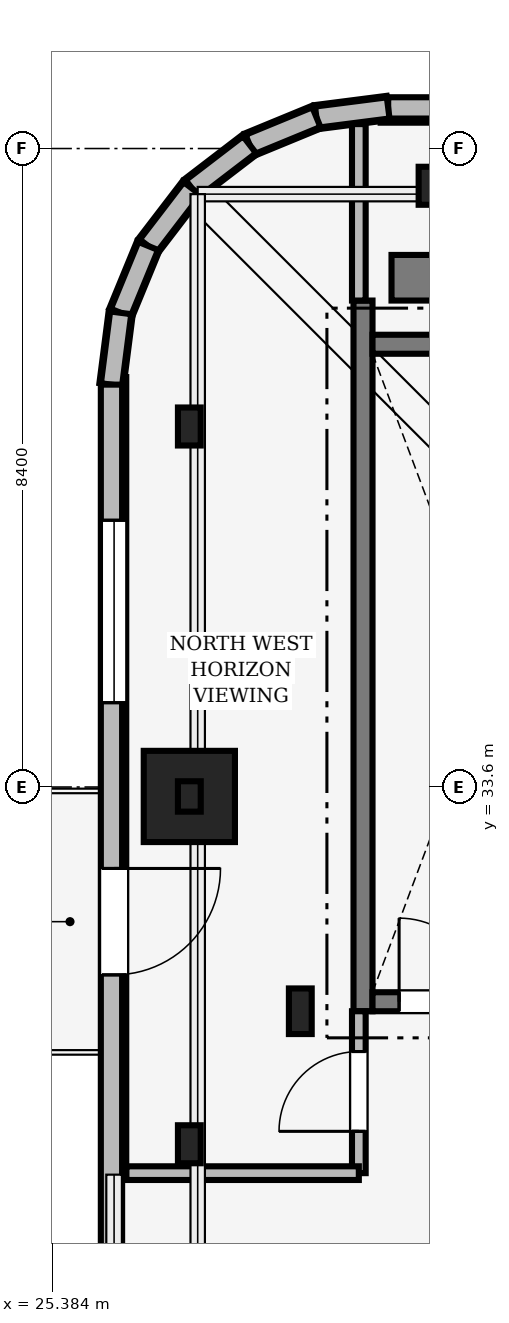
"""IFC4 building model, lengths in metres.
Left out: names, types, materials, properties, quantities, classifications, styles, units other than length and angle.
Written with IfcOpenShell. Run it as: python <this file> out.ifc"""

import sys

from ifc_helpers import new_model, si_unit, direction, frame, frame_2d, origin, origin_2d, place, context, subcontext, project, spatial, rectangle, i_section, extrude, source, transform, mapped, element, fill, save


model = new_model("IFC4")
c1 = context("Model", 3, precision=1e-05, world=origin(), true_north=direction((0.0, 1.0)))
c2 = subcontext(c1, "Body", "Model", "MODEL_VIEW")
j1 = project(units=[si_unit("LENGTHUNIT", "METRE"), si_unit("PLANEANGLEUNIT", "RADIAN")], contexts=[c1])
p1 = place(None, origin())
s1 = spatial("IfcSite", under=j1, at=p1, CompositionType="ELEMENT")
p2 = place(p1, origin())
s2 = spatial("IfcBuilding", under=s1, at=p2, CompositionType="ELEMENT")
p3 = place(p2, frame((0.0, 0.0, 301.15)))
s3 = spatial("IfcBuildingStorey", under=s2, at=p3, CompositionType="ELEMENT", Elevation=301.15)
m1 = source(origin(), c2, "Body", "SweptSolid", [
    extrude(rectangle(XDim=17.52, YDim=0.6, at=frame_2d((8.76, 0.0))), origin(), (0.0, 0.0, 1.0), 4.7),
])
p4 = place(p3, frame((29.85, 40.3, 0.0), z_axis=(0.0, 0.0, 1.0), x_axis=(1.0, 0.0, 0.0)))
e1 = element("IfcWall", 1, at=p4, inside=s3, PredefinedType="SHEAR", context=c2, shape_type="MappedRepresentation", body=[
    mapped(m1, transform((0.0, 0.0, 0.0), scale=1.0)),
])
m2 = source(origin(), c2, "Body", "SweptSolid", [
    extrude(i_section(OverallWidth=0.3, OverallDepth=0.6, WebThickness=0.015, FlangeThickness=0.03, FilletRadius=0.027, at=origin_2d()), origin(), (0.0, 0.0, 1.0), 4.6),
])
p5 = place(p3, frame((28.65, 30.65, 0.0), z_axis=(0.0, 0.0, 1.0), x_axis=(1.0, 0.0, 0.0)))
e2 = element("IfcColumn", 2, at=p5, inside=s3, PredefinedType="COLUMN", context=c2, shape_type="MappedRepresentation", body=[
    mapped(m2, transform((0.0, 0.0, 0.0), scale=1.0)),
])
m3 = source(origin(), c2, "Body", "SweptSolid", [
    extrude(rectangle(XDim=1.2, YDim=1.2, at=origin_2d()), origin(), (0.0, 0.0, 1.0), 4.6),
])
p6 = place(p3, frame((27.19, 33.476, 0.0), z_axis=(0.0, 0.0, 1.0), x_axis=(1.0, 0.0, 0.0)))
e3 = element("IfcColumn", 3, at=p6, inside=s3, PredefinedType="COLUMN", context=c2, shape_type="MappedRepresentation", body=[
    mapped(m3, transform((0.0, 0.0, 0.0), scale=1.0)),
])
m4 = source(origin(), c2, "Body", "SweptSolid", [
    extrude(i_section(OverallWidth=0.3, OverallDepth=0.5, WebThickness=0.014, FlangeThickness=0.028, FilletRadius=0.027, at=origin_2d()), origin(), (0.0, 0.0, 1.0), 4.6),
])
for number, where, z_axis, x_axis in (
    (4, (30.357, 41.51, 0.0), (0.0, 0.0, 1.0), (1.0, 0.0, 0.0)),
    (5, (27.19, 38.343, 0.0), (0.0, 0.0, 1.0), (1.0, 0.0, 0.0)),
    (6, (27.19, 28.9, 0.0), (0.0, 0.0, 1.0), (1.0, 0.0, 0.0)),
):
    element("IfcColumn", number, at=place(p3, frame(where, z_axis=z_axis, x_axis=x_axis)), inside=s3, PredefinedType="COLUMN", context=c2, shape_type="MappedRepresentation", body=[
        mapped(m4, transform((0.0, 0.0, 0.0), scale=1.0)),
    ])
m5 = source(origin(), c2, "Body", "SweptSolid", [
    extrude(i_section(OverallWidth=0.3, OverallDepth=0.4, WebThickness=0.013, FlangeThickness=0.024, FilletRadius=0.027, at=origin_2d()), origin(), (0.0, 0.0, 1.0), 12.85),
])
p7 = place(p3, frame((27.19, 33.476, 5.0), z_axis=(0.0, 0.0, 1.0), x_axis=(1.0, 0.0, 0.0)))
e7 = element("IfcColumn", 7, at=p7, inside=s3, PredefinedType="COLUMN", context=c2, shape_type="MappedRepresentation", body=[
    mapped(m5, transform((0.0, 0.0, 0.0), scale=1.0)),
])
m6 = source(origin(), c2, "Body", "SweptSolid", [
    extrude(rectangle(XDim=10.493, YDim=0.32, at=frame_2d((5.247, 0.0))), origin(), (0.0, 0.0, 1.0), 4.6),
])
p8 = place(p3, frame((40.2, 42.5, 0.0), z_axis=(0.0, 0.0, 1.0), x_axis=(-1.0, 0.0, 0.0)))
e8 = element("IfcWall", 8, at=p8, inside=s3, PredefinedType="SOLIDWALL", context=c2, shape_type="MappedRepresentation", body=[
    mapped(m6, transform((0.0, 0.0, 0.0), scale=1.0)),
])
m7 = source(origin(), c2, "Body", "SweptSolid", [
    extrude(rectangle(XDim=2.4, YDim=3.2, at=frame_2d((1.2, 1.6))), frame((0.0, 0.17, 0.0), z_axis=(0.0, -1.0, 0.0), x_axis=(1.0, 0.0, 0.0)), (0.0, 0.0, 1.0), 0.34),
])
p9 = place(p8, frame((6.209, 0.0, 0.72)))
e9 = element("IfcOpeningElement", 9, at=p9, cuts=e8, PredefinedType="OPENING", context=c2, shape_type="MappedRepresentation", body=[
    mapped(m7, transform((0.0, 0.0, 0.0), scale=1.0)),
])
p10 = place(p3, frame((26.2, 38.993, 0.0), z_axis=(0.0, 0.0, 1.0), x_axis=(0.0, -1.0, 0.0)))
e10 = element("IfcWall", 10, at=p10, inside=s3, PredefinedType="SOLIDWALL", context=c2, shape_type="MappedRepresentation", body=[
    mapped(m6, transform((0.0, 0.0, 0.0), scale=1.0)),
])
m8 = source(origin(), c2, "Body", "SweptSolid", [
    extrude(rectangle(XDim=1.4, YDim=2.3, at=frame_2d((0.7, 1.15))), frame((0.0, 0.17, 0.0), z_axis=(0.0, -1.0, 0.0), x_axis=(1.0, 0.0, 0.0)), (0.0, 0.0, 1.0), 0.34),
])
p11 = place(p10, frame((6.465, 0.0, 0.0)))
e11 = element("IfcOpeningElement", 11, at=p11, cuts=e10, PredefinedType="OPENING", context=c2, shape_type="MappedRepresentation", body=[
    mapped(m8, transform((0.0, 0.0, 0.0), scale=1.0)),
])
p12 = place(p10, frame((1.884, 0.0, 0.72)))
e12 = element("IfcOpeningElement", 12, at=p12, cuts=e10, PredefinedType="OPENING", context=c2, shape_type="MappedRepresentation", body=[
    mapped(m7, transform((0.0, 0.0, 0.0), scale=1.0)),
])
m9 = source(origin(), c2, "Body", "SweptSolid", [
    extrude(rectangle(XDim=0.952, YDim=0.32, at=frame_2d((0.476, 0.0))), origin(), (0.0, 0.0, 1.0), 4.6),
])
p13 = place(p3, frame((29.806, 42.534, 0.0), z_axis=(0.0, 0.0, 1.0), x_axis=(-0.991850128376, -0.127410057845, 0.0)))
e13 = element("IfcWall", 13, at=p13, inside=s3, PredefinedType="SOLIDWALL", context=c2, shape_type="MappedRepresentation", body=[
    mapped(m9, transform((0.0, 0.0, 0.0), scale=1.0)),
])
m10 = source(origin(), c2, "Body", "SweptSolid", [
    extrude(rectangle(XDim=0.951, YDim=0.32, at=frame_2d((0.476, 0.0))), origin(), (0.0, 0.0, 1.0), 4.6),
])
p14 = place(p3, frame((28.862, 42.413, 0.0), z_axis=(0.0, 0.0, 1.0), x_axis=(-0.924731243055, -0.380620714252, 0.0)))
e14 = element("IfcWall", 14, at=p14, inside=s3, PredefinedType="SOLIDWALL", context=c2, shape_type="MappedRepresentation", body=[
    mapped(m10, transform((0.0, 0.0, 0.0), scale=1.0)),
])
m11 = source(origin(), c2, "Body", "SweptSolid", [
    extrude(rectangle(XDim=0.951, YDim=0.32, at=frame_2d((0.475, 0.0))), origin(), (0.0, 0.0, 1.0), 4.6),
])
p15 = place(p3, frame((27.982, 42.051, 0.0), z_axis=(0.0, 0.0, 1.0), x_axis=(-0.793825387185, -0.608145751166, 0.0)))
e15 = element("IfcWall", 15, at=p15, inside=s3, PredefinedType="SOLIDWALL", context=c2, shape_type="MappedRepresentation", body=[
    mapped(m11, transform((0.0, 0.0, 0.0), scale=1.0)),
])
m12 = source(origin(), c2, "Body", "SweptSolid", [
    extrude(rectangle(XDim=0.951, YDim=0.32, at=frame_2d((0.476, 0.0))), origin(), (0.0, 0.0, 1.0), 4.6),
])
p16 = place(p3, frame((27.227, 41.473, 0.0), z_axis=(0.0, 0.0, 1.0), x_axis=(-0.608183591152, -0.793796396725, 0.0)))
e16 = element("IfcWall", 16, at=p16, inside=s3, PredefinedType="SOLIDWALL", context=c2, shape_type="MappedRepresentation", body=[
    mapped(m12, transform((0.0, 0.0, 0.0), scale=1.0)),
])
p17 = place(p3, frame((26.649, 40.718, 0.0), z_axis=(0.0, 0.0, 1.0), x_axis=(-0.380620714252, -0.924731243055, 0.0)))
e17 = element("IfcWall", 17, at=p17, inside=s3, PredefinedType="SOLIDWALL", context=c2, shape_type="MappedRepresentation", body=[
    mapped(m10, transform((0.0, 0.0, 0.0), scale=1.0)),
])
p18 = place(p3, frame((26.287, 39.838, 0.0), z_axis=(0.0, 0.0, 1.0), x_axis=(-0.127410057845, -0.991850128376, 0.0)))
e18 = element("IfcWall", 18, at=p18, inside=s3, PredefinedType="SOLIDWALL", context=c2, shape_type="MappedRepresentation", body=[
    mapped(m9, transform((0.0, 0.0, 0.0), scale=1.0)),
])
m13 = source(origin(), c2, "Body", "SweptSolid", [
    extrude(rectangle(XDim=27.388, YDim=0.28, at=frame_2d((13.694, 0.0))), origin(), (0.0, 0.0, 1.0), 1.15),
])
p19 = place(p3, frame((57.194, 42.534, 5.0), z_axis=(0.0, 0.0, 1.0), x_axis=(-1.0, 0.0, 0.0)))
e19 = element("IfcWall", 19, at=p19, inside=s3, PredefinedType="SOLIDWALL", context=c2, shape_type="MappedRepresentation", body=[
    mapped(m13, transform((0.0, 0.0, 0.0), scale=1.0)),
])
m14 = source(origin(), c2, "Body", "SweptSolid", [
    extrude(rectangle(XDim=0.952, YDim=0.28, at=frame_2d((0.476, 0.0))), origin(), (0.0, 0.0, 1.0), 1.15),
])
p20 = place(p3, frame((29.806, 42.534, 5.0), z_axis=(0.0, 0.0, 1.0), x_axis=(-0.991850128376, -0.127410057845, 0.0)))
e20 = element("IfcWall", 20, at=p20, inside=s3, PredefinedType="SOLIDWALL", context=c2, shape_type="MappedRepresentation", body=[
    mapped(m14, transform((0.0, 0.0, 0.0), scale=1.0)),
])
m15 = source(origin(), c2, "Body", "SweptSolid", [
    extrude(rectangle(XDim=0.951, YDim=0.28, at=frame_2d((0.476, 0.0))), origin(), (0.0, 0.0, 1.0), 1.15),
])
p21 = place(p3, frame((28.862, 42.413, 5.0), z_axis=(0.0, 0.0, 1.0), x_axis=(-0.924731243055, -0.380620714252, 0.0)))
e21 = element("IfcWall", 21, at=p21, inside=s3, PredefinedType="SOLIDWALL", context=c2, shape_type="MappedRepresentation", body=[
    mapped(m15, transform((0.0, 0.0, 0.0), scale=1.0)),
])
m16 = source(origin(), c2, "Body", "SweptSolid", [
    extrude(rectangle(XDim=0.951, YDim=0.28, at=frame_2d((0.475, 0.0))), origin(), (0.0, 0.0, 1.0), 1.15),
])
p22 = place(p3, frame((27.982, 42.051, 5.0), z_axis=(0.0, 0.0, 1.0), x_axis=(-0.793825387185, -0.608145751166, 0.0)))
e22 = element("IfcWall", 22, at=p22, inside=s3, PredefinedType="SOLIDWALL", context=c2, shape_type="MappedRepresentation", body=[
    mapped(m16, transform((0.0, 0.0, 0.0), scale=1.0)),
])
m17 = source(origin(), c2, "Body", "SweptSolid", [
    extrude(rectangle(XDim=0.951, YDim=0.28, at=frame_2d((0.476, 0.0))), origin(), (0.0, 0.0, 1.0), 1.15),
])
p23 = place(p3, frame((27.227, 41.473, 5.0), z_axis=(0.0, 0.0, 1.0), x_axis=(-0.608183591152, -0.793796396725, 0.0)))
e23 = element("IfcWall", 23, at=p23, inside=s3, PredefinedType="SOLIDWALL", context=c2, shape_type="MappedRepresentation", body=[
    mapped(m17, transform((0.0, 0.0, 0.0), scale=1.0)),
])
p24 = place(p3, frame((26.649, 40.718, 5.0), z_axis=(0.0, 0.0, 1.0), x_axis=(-0.380620714252, -0.924731243055, 0.0)))
e24 = element("IfcWall", 24, at=p24, inside=s3, PredefinedType="SOLIDWALL", context=c2, shape_type="MappedRepresentation", body=[
    mapped(m15, transform((0.0, 0.0, 0.0), scale=1.0)),
])
p25 = place(p3, frame((26.287, 39.838, 5.0), z_axis=(0.0, 0.0, 1.0), x_axis=(-0.127410057845, -0.991850128376, 0.0)))
e25 = element("IfcWall", 25, at=p25, inside=s3, PredefinedType="SOLIDWALL", context=c2, shape_type="MappedRepresentation", body=[
    mapped(m14, transform((0.0, 0.0, 0.0), scale=1.0)),
])
p26 = place(p3, frame((26.166, 38.894, 5.0), z_axis=(0.0, 0.0, 1.0), x_axis=(0.0, -1.0, 0.0)))
e26 = element("IfcWall", 26, at=p26, inside=s3, PredefinedType="SOLIDWALL", context=c2, shape_type="MappedRepresentation", body=[
    mapped(m13, transform((0.0, 0.0, 0.0), scale=1.0)),
])
m18 = source(origin(), c2, "Body", "SweptSolid", [
    extrude(rectangle(XDim=9.35, YDim=0.25, at=frame_2d((4.675, 0.0))), origin(), (0.0, 0.0, 1.0), 4.6),
])
p27 = place(p3, frame((29.475, 30.65, 0.0), z_axis=(0.0, 0.0, 1.0), x_axis=(0.0, 1.0, 0.0)))
e27 = element("IfcWall", 27, at=p27, inside=s3, PredefinedType="SOLIDWALL", context=c2, shape_type="MappedRepresentation", body=[
    mapped(m18, transform((0.0, 0.0, 0.0), scale=1.0)),
])
m19 = source(origin(), c2, "Body", "SweptSolid", [
    extrude(rectangle(XDim=3.15, YDim=0.25, at=frame_2d((1.575, 0.0))), origin(), (0.0, 0.0, 1.0), 4.6),
])
p28 = place(p3, frame((29.6, 39.425, 0.0), z_axis=(0.0, 0.0, 1.0), x_axis=(1.0, 0.0, 0.0)))
e28 = element("IfcWall", 28, at=p28, inside=s3, PredefinedType="SOLIDWALL", context=c2, shape_type="MappedRepresentation", body=[
    mapped(m19, transform((0.0, 0.0, 0.0), scale=1.0)),
])
p29 = place(p3, frame((29.6, 30.775, 0.0), z_axis=(0.0, 0.0, 1.0), x_axis=(1.0, 0.0, 0.0)))
e29 = element("IfcWall", 29, at=p29, inside=s3, PredefinedType="SOLIDWALL", context=c2, shape_type="MappedRepresentation", body=[
    mapped(m19, transform((0.0, 0.0, 0.0), scale=1.0)),
])
m20 = source(origin(), c2, "Body", "SweptSolid", [
    extrude(rectangle(XDim=1.1, YDim=2.2, at=frame_2d((0.55, 1.1))), frame((0.0, 0.135, 0.0), z_axis=(0.0, -1.0, 0.0), x_axis=(1.0, 0.0, 0.0)), (0.0, 0.0, 1.0), 0.27),
])
p30 = place(p29, frame((0.35, 0.0, 0.0)))
e30 = element("IfcOpeningElement", 30, at=p30, cuts=e29, PredefinedType="OPENING", context=c2, shape_type="MappedRepresentation", body=[
    mapped(m20, transform((0.0, 0.0, 0.0), scale=1.0)),
])
m21 = source(origin(), c2, "Body", "SweptSolid", [
    extrude(rectangle(XDim=2.13, YDim=0.18, at=frame_2d((1.065, 0.0))), origin(), (0.0, 0.0, 1.0), 4.6),
])
p31 = place(p3, frame((29.42, 28.52, 0.0), z_axis=(0.0, 0.0, 1.0), x_axis=(0.0, 1.0, 0.0)))
e31 = element("IfcWall", 31, at=p31, inside=s3, PredefinedType="PARTITIONING", context=c2, shape_type="MappedRepresentation", body=[
    mapped(m21, transform((0.0, 0.0, 0.0), scale=1.0)),
])
m22 = source(origin(), c2, "Body", "SweptSolid", [
    extrude(rectangle(XDim=1.05, YDim=2.2, at=frame_2d((0.525, 1.1))), frame((0.0, 0.1, 0.0), z_axis=(0.0, -1.0, 0.0), x_axis=(1.0, 0.0, 0.0)), (0.0, 0.0, 1.0), 0.2),
])
p32 = place(p31, frame((0.55, 0.0, 0.0)))
e32 = element("IfcOpeningElement", 32, at=p32, cuts=e31, PredefinedType="OPENING", context=c2, shape_type="MappedRepresentation", body=[
    mapped(m22, transform((0.0, 0.0, 0.0), scale=1.0)),
])
m23 = source(origin(), c2, "Body", "SweptSolid", [
    extrude(rectangle(XDim=2.322, YDim=0.18, at=frame_2d((1.161, 0.0))), origin(), (0.0, 0.0, 1.0), 4.6),
])
p33 = place(p3, frame((29.42, 40.0, 0.0), z_axis=(0.0, 0.0, 1.0), x_axis=(0.0, 1.0, 0.0)))
e33 = element("IfcWall", 33, at=p33, inside=s3, PredefinedType="PARTITIONING", context=c2, shape_type="MappedRepresentation", body=[
    mapped(m23, transform((0.0, 0.0, 0.0), scale=1.0)),
])
m24 = source(origin(), c2, "Body", "SweptSolid", [
    extrude(rectangle(XDim=3.058, YDim=0.18, at=frame_2d((1.529, 0.0))), origin(), (0.0, 0.0, 1.0), 4.142),
])
p34 = place(p3, frame((26.362, 28.52, 0.0), z_axis=(0.0, 0.0, 1.0), x_axis=(1.0, 0.0, 0.0)))
e34 = element("IfcWall", 34, at=p34, inside=s3, PredefinedType="PARTITIONING", context=c2, shape_type="MappedRepresentation", body=[
    mapped(m24, transform((0.0, 0.0, 0.0), scale=1.0)),
])
m25 = source(origin(), c2, "Body", "SweptSolid", [
    extrude(rectangle(XDim=1.4, YDim=2.3, at=frame_2d((0.7, 1.15))), frame((0.0, 0.025, 0.0), z_axis=(0.0, -1.0, 0.0), x_axis=(1.0, 0.0, 0.0)), (0.0, 0.0, 1.0), 0.05),
])
p35 = place(p11, frame((1.4, 0.0, 0.0), z_axis=(0.0, 0.0, 1.0), x_axis=(-1.0, 0.0, 0.0)))
e35 = element("IfcDoor", 35, at=p35, inside=s3, OperationType="DOUBLE_DOOR_SLIDING", PredefinedType="DOOR", context=c2, shape_type="MappedRepresentation", body=[
    mapped(m25, transform((0.0, 0.0, 0.0), scale=1.0)),
])
fill(e11, e35)
m26 = source(origin(), c2, "Body", "SweptSolid", [
    extrude(rectangle(XDim=2.4, YDim=3.2, at=frame_2d((1.2, 1.6))), frame((0.0, 0.03, 0.0), z_axis=(0.0, -1.0, 0.0), x_axis=(1.0, 0.0, 0.0)), (0.0, 0.0, 1.0), 0.06),
])
p36 = place(p12, origin())
e36 = element("IfcWindow", 36, at=p36, inside=s3, PartitioningType="SINGLE_PANEL", PredefinedType="WINDOW", context=c2, shape_type="MappedRepresentation", body=[
    mapped(m26, transform((0.0, 0.0, 0.0), scale=1.0)),
])
fill(e12, e36)
m27 = source(origin(), c2, "Body", "SweptSolid", [
    extrude(rectangle(XDim=1.1, YDim=2.2, at=frame_2d((0.55, 1.1))), frame((0.0, 0.025, 0.0), z_axis=(0.0, -1.0, 0.0), x_axis=(1.0, 0.0, 0.0)), (0.0, 0.0, 1.0), 0.05),
])
p37 = place(p30, origin())
e37 = element("IfcDoor", 37, at=p37, inside=s3, OperationType="SINGLE_SWING_LEFT", PredefinedType="DOOR", context=c2, shape_type="MappedRepresentation", body=[
    mapped(m27, transform((0.0, 0.0, 0.0), scale=1.0)),
])
fill(e30, e37)
m28 = source(origin(), c2, "Body", "SweptSolid", [
    extrude(rectangle(XDim=1.05, YDim=2.2, at=frame_2d((0.525, 1.1))), frame((0.0, 0.025, 0.0), z_axis=(0.0, -1.0, 0.0), x_axis=(1.0, 0.0, 0.0)), (0.0, 0.0, 1.0), 0.05),
])
p38 = place(p32, origin())
e38 = element("IfcDoor", 38, at=p38, inside=s3, OperationType="SINGLE_SWING_LEFT", PredefinedType="DOOR", context=c2, shape_type="MappedRepresentation", body=[
    mapped(m28, transform((0.0, 0.0, 0.0), scale=1.0)),
])
fill(e32, e38)
save(model, sys.argv[1])
